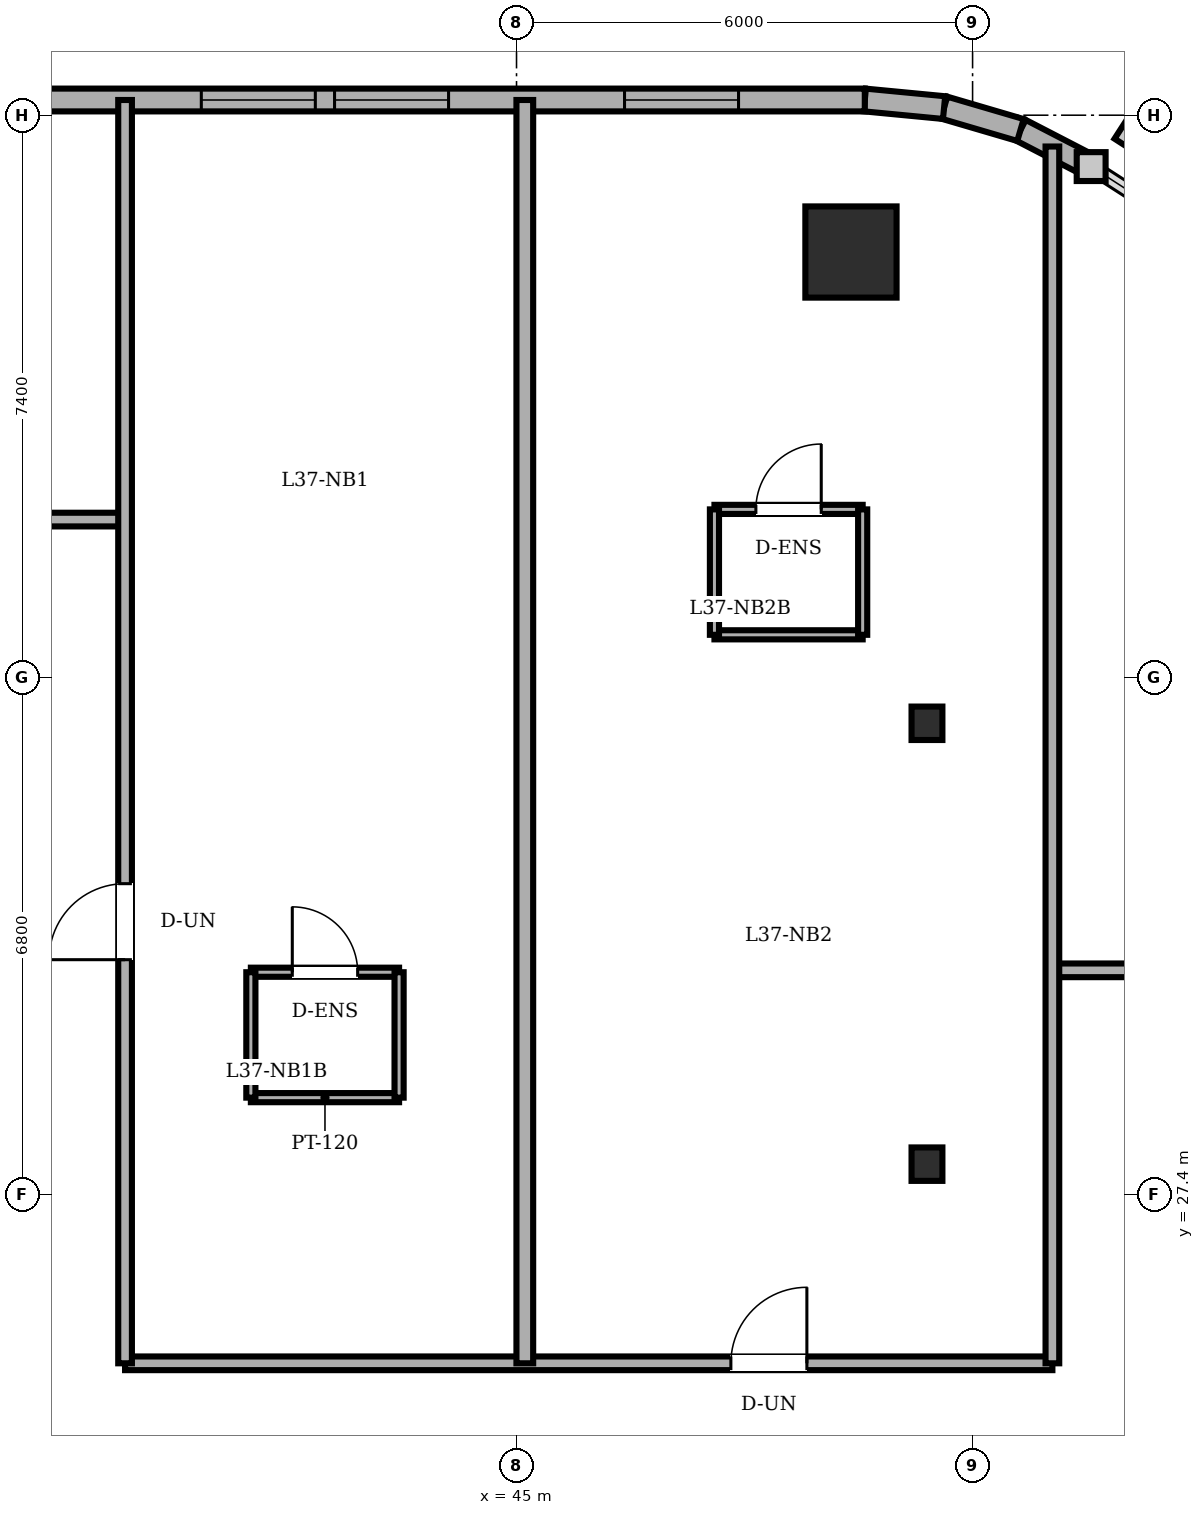
"""IFC4 building model, lengths in metres.
Left out: names, types, materials, properties, quantities, classifications, styles, units other than length and angle.
Written with IfcOpenShell. Run it as: python <this file> out.ifc"""

import sys

from ifc_helpers import new_model, si_unit, direction, frame, frame_2d, origin, origin_2d, place, context, subcontext, project, spatial, rectangle, circle, i_section, extrude, element, fill, save


model = new_model("IFC4")
c1 = context("Model", 3, precision=1e-05, world=origin(), true_north=direction((0.0, 1.0)))
c2 = subcontext(c1, "Body", "Model", "MODEL_VIEW")
j1 = project(units=[si_unit("LENGTHUNIT", "METRE"), si_unit("PLANEANGLEUNIT", "RADIAN")], contexts=[c1])
p1 = place(None, origin())
s1 = spatial("IfcSite", under=j1, at=p1, CompositionType="ELEMENT")
p2 = place(p1, origin())
s2 = spatial("IfcBuilding", under=s1, at=p2, CompositionType="ELEMENT")
p3 = place(p2, frame((0.0, 0.0, 143.8)))
s3 = spatial("IfcBuildingStorey", under=s2, at=p3, CompositionType="ELEMENT", Elevation=143.8)
p4 = place(p3, frame((49.4, 39.8, 0.0), z_axis=(0.0, 0.0, 1.0), x_axis=(1.0, 0.0, 0.0)))
e1 = element("IfcColumn", 1, at=p4, inside=s3, PredefinedType="COLUMN", context=c2, shape_type="SweptSolid", body=[
    extrude(circle(Radius=0.6, at=origin_2d()), origin(), (0.0, 0.0, 1.0), 3.6),
])
for number, where, z_axis, x_axis in (
    (2, (50.4, 27.8, 0.0), (0.0, 0.0, 1.0), (1.0, 0.0, 0.0)),
    (3, (50.4, 33.6, 0.0), (0.0, 0.0, 1.0), (1.0, 0.0, 0.0)),
):
    element("IfcColumn", number, at=place(p3, frame(where, z_axis=z_axis, x_axis=x_axis)), inside=s3, PredefinedType="COLUMN", context=c2, shape_type="SweptSolid", body=[
        extrude(i_section(OverallWidth=0.406, OverallDepth=0.44, WebThickness=0.024, FlangeThickness=0.039, FilletRadius=0.015, at=origin_2d()), origin(), (0.0, 0.0, 1.0), 3.6),
    ])
p5 = place(p3, frame((52.56, 40.924, 0.0), z_axis=(0.0, 0.0, 1.0), x_axis=(-0.888283247196, 0.459296062198, 0.0)))
e4 = element("IfcWall", 4, at=p5, inside=s3, PredefinedType="SOLIDWALL", context=c2, shape_type="SweptSolid", body=[
    extrude(rectangle(XDim=1.047, YDim=0.3, at=frame_2d((0.523, 0.0))), origin(), (0.0, 0.0, 1.0), 3.4),
])
p6 = place(p3, frame((51.63, 41.405, 0.0), z_axis=(0.0, 0.0, 1.0), x_axis=(-0.959528674476, 0.281610942363, 0.0)))
e5 = element("IfcWall", 5, at=p6, inside=s3, PredefinedType="SOLIDWALL", context=c2, shape_type="SweptSolid", body=[
    extrude(rectangle(XDim=1.047, YDim=0.3, at=frame_2d((0.524, 0.0))), origin(), (0.0, 0.0, 1.0), 3.4),
])
p7 = place(p3, frame((50.625, 41.7, 0.0), z_axis=(0.0, 0.0, 1.0), x_axis=(-0.995426089968, 0.095534807324, 0.0)))
e6 = element("IfcWall", 6, at=p7, inside=s3, PredefinedType="SOLIDWALL", context=c2, shape_type="SweptSolid", body=[
    extrude(rectangle(XDim=1.048, YDim=0.3, at=frame_2d((0.524, 0.0))), origin(), (0.0, 0.0, 1.0), 3.4),
])
p8 = place(p3, frame((49.582, 41.8, 0.0), z_axis=(0.0, 0.0, 1.0), x_axis=(-1.0, 0.0, 0.0)))
e7 = element("IfcWall", 7, at=p8, inside=s3, PredefinedType="SOLIDWALL", context=c2, shape_type="SweptSolid", body=[
    extrude(rectangle(XDim=30.282, YDim=0.3, at=frame_2d((15.141, 0.0))), origin(), (0.0, 0.0, 1.0), 3.4),
])
p9 = place(p8, frame((25.707, 0.0, 0.0)))
e8 = element("IfcOpeningElement", 8, at=p9, cuts=e7, PredefinedType="OPENING", context=c2, shape_type="SweptSolid", body=[
    extrude(rectangle(XDim=0.95, YDim=2.2, at=frame_2d((0.475, 1.1))), frame((0.0, 0.16, 0.0), z_axis=(0.0, -1.0, 0.0), x_axis=(1.0, 0.0, 0.0)), (0.0, 0.0, 1.0), 0.32),
])
p10 = place(p8, frame((1.661, 0.0, 0.85)))
e9 = element("IfcOpeningElement", 9, at=p10, cuts=e7, PredefinedType="OPENING", context=c2, shape_type="SweptSolid", body=[
    extrude(rectangle(XDim=1.5, YDim=1.55, at=frame_2d((0.75, 0.775))), frame((0.0, 0.16, 0.0), z_axis=(0.0, -1.0, 0.0), x_axis=(1.0, 0.0, 0.0)), (0.0, 0.0, 1.0), 0.32),
])
p11 = place(p8, frame((5.476, 0.0, 0.85)))
e10 = element("IfcOpeningElement", 10, at=p11, cuts=e7, PredefinedType="OPENING", context=c2, shape_type="SweptSolid", body=[
    extrude(rectangle(XDim=1.5, YDim=1.55, at=frame_2d((0.75, 0.775))), frame((0.0, 0.16, 0.0), z_axis=(0.0, -1.0, 0.0), x_axis=(1.0, 0.0, 0.0)), (0.0, 0.0, 1.0), 0.32),
])
p12 = place(p8, frame((7.229, 0.0, 0.85)))
e11 = element("IfcOpeningElement", 11, at=p12, cuts=e7, PredefinedType="OPENING", context=c2, shape_type="SweptSolid", body=[
    extrude(rectangle(XDim=1.5, YDim=1.55, at=frame_2d((0.75, 0.775))), frame((0.0, 0.16, 0.0), z_axis=(0.0, -1.0, 0.0), x_axis=(1.0, 0.0, 0.0)), (0.0, 0.0, 1.0), 0.32),
])
p13 = place(p8, frame((11.665, 0.0, 0.85)))
e12 = element("IfcOpeningElement", 12, at=p13, cuts=e7, PredefinedType="OPENING", context=c2, shape_type="SweptSolid", body=[
    extrude(rectangle(XDim=1.5, YDim=1.55, at=frame_2d((0.75, 0.775))), frame((0.0, 0.16, 0.0), z_axis=(0.0, -1.0, 0.0), x_axis=(1.0, 0.0, 0.0)), (0.0, 0.0, 1.0), 0.32),
])
p14 = place(p8, frame((14.349, 0.0, 0.85)))
e13 = element("IfcOpeningElement", 13, at=p14, cuts=e7, PredefinedType="OPENING", context=c2, shape_type="SweptSolid", body=[
    extrude(rectangle(XDim=1.5, YDim=1.55, at=frame_2d((0.75, 0.775))), frame((0.0, 0.16, 0.0), z_axis=(0.0, -1.0, 0.0), x_axis=(1.0, 0.0, 0.0)), (0.0, 0.0, 1.0), 0.32),
])
p15 = place(p8, frame((18.932, 0.0, 0.85)))
e14 = element("IfcOpeningElement", 14, at=p15, cuts=e7, PredefinedType="OPENING", context=c2, shape_type="SweptSolid", body=[
    extrude(rectangle(XDim=1.5, YDim=1.55, at=frame_2d((0.75, 0.775))), frame((0.0, 0.16, 0.0), z_axis=(0.0, -1.0, 0.0), x_axis=(1.0, 0.0, 0.0)), (0.0, 0.0, 1.0), 0.32),
])
p16 = place(p8, frame((22.532, 0.0, 0.85)))
e15 = element("IfcOpeningElement", 15, at=p16, cuts=e7, PredefinedType="OPENING", context=c2, shape_type="SweptSolid", body=[
    extrude(rectangle(XDim=1.5, YDim=1.55, at=frame_2d((0.75, 0.775))), frame((0.0, 0.16, 0.0), z_axis=(0.0, -1.0, 0.0), x_axis=(1.0, 0.0, 0.0)), (0.0, 0.0, 1.0), 0.32),
])
p17 = place(p8, frame((27.532, 0.0, 0.85)))
e16 = element("IfcOpeningElement", 16, at=p17, cuts=e7, PredefinedType="OPENING", context=c2, shape_type="SweptSolid", body=[
    extrude(rectangle(XDim=1.5, YDim=1.55, at=frame_2d((0.75, 0.775))), frame((0.0, 0.16, 0.0), z_axis=(0.0, -1.0, 0.0), x_axis=(1.0, 0.0, 0.0)), (0.0, 0.0, 1.0), 0.32),
])
p18 = place(p3, frame((41.505, 30.325, 0.0), z_axis=(0.0, 0.0, 1.0), x_axis=(1.0, 0.0, 0.0)))
e17 = element("IfcWall", 17, at=p18, inside=s3, PredefinedType="PARTITIONING", context=c2, shape_type="SweptSolid", body=[
    extrude(rectangle(XDim=1.95, YDim=0.12, at=frame_2d((0.975, 0.0))), origin(), (0.0, 0.0, 1.0), 3.4),
])
p19 = place(p18, frame((0.545, 0.0, 0.0)))
e18 = element("IfcOpeningElement", 18, at=p19, cuts=e17, PredefinedType="OPENING", context=c2, shape_type="SweptSolid", body=[
    extrude(rectangle(XDim=0.86, YDim=2.1, at=frame_2d((0.43, 1.05))), frame((0.0, 0.07, 0.0), z_axis=(0.0, -1.0, 0.0), x_axis=(1.0, 0.0, 0.0)), (0.0, 0.0, 1.0), 0.14),
])
p20 = place(p3, frame((43.455, 28.675, 0.0), z_axis=(0.0, 0.0, 1.0), x_axis=(-1.0, 0.0, 0.0)))
e19 = element("IfcWall", 19, at=p20, inside=s3, PredefinedType="PARTITIONING", context=c2, shape_type="SweptSolid", body=[
    extrude(rectangle(XDim=1.95, YDim=0.12, at=frame_2d((0.975, 0.0))), origin(), (0.0, 0.0, 1.0), 3.4),
])
for number, where, z_axis, x_axis in (
    (20, (41.505, 30.325, 0.0), (0.0, 0.0, 1.0), (0.0, -1.0, 0.0)),
    (21, (43.455, 28.675, 0.0), (0.0, 0.0, 1.0), (0.0, 1.0, 0.0)),
):
    element("IfcWall", number, at=place(p3, frame(where, z_axis=z_axis, x_axis=x_axis)), inside=s3, PredefinedType="PARTITIONING", context=c2, shape_type="SweptSolid", body=[
        extrude(rectangle(XDim=1.65, YDim=0.12, at=frame_2d((0.825, 0.0))), origin(), (0.0, 0.0, 1.0), 3.4),
    ])
p21 = place(p3, frame((47.604, 36.414, 0.0), z_axis=(0.0, 0.0, 1.0), x_axis=(1.0, 0.0, 0.0)))
e22 = element("IfcWall", 22, at=p21, inside=s3, PredefinedType="PARTITIONING", context=c2, shape_type="SweptSolid", body=[
    extrude(rectangle(XDim=1.95, YDim=0.12, at=frame_2d((0.975, 0.0))), origin(), (0.0, 0.0, 1.0), 3.4),
])
p22 = place(p21, frame((0.545, 0.0, 0.0)))
e23 = element("IfcOpeningElement", 23, at=p22, cuts=e22, PredefinedType="OPENING", context=c2, shape_type="SweptSolid", body=[
    extrude(rectangle(XDim=0.86, YDim=2.1, at=frame_2d((0.43, 1.05))), frame((0.0, 0.07, 0.0), z_axis=(0.0, -1.0, 0.0), x_axis=(1.0, 0.0, 0.0)), (0.0, 0.0, 1.0), 0.14),
])
p23 = place(p3, frame((49.554, 34.764, 0.0), z_axis=(0.0, 0.0, 1.0), x_axis=(-1.0, 0.0, 0.0)))
e24 = element("IfcWall", 24, at=p23, inside=s3, PredefinedType="PARTITIONING", context=c2, shape_type="SweptSolid", body=[
    extrude(rectangle(XDim=1.95, YDim=0.12, at=frame_2d((0.975, 0.0))), origin(), (0.0, 0.0, 1.0), 3.4),
])
for number, where, z_axis, x_axis in (
    (25, (47.604, 36.414, 0.0), (0.0, 0.0, 1.0), (0.0, -1.0, 0.0)),
    (26, (49.554, 34.764, 0.0), (0.0, 0.0, 1.0), (0.0, 1.0, 0.0)),
):
    element("IfcWall", number, at=place(p3, frame(where, z_axis=z_axis, x_axis=x_axis)), inside=s3, PredefinedType="PARTITIONING", context=c2, shape_type="SweptSolid", body=[
        extrude(rectangle(XDim=1.65, YDim=0.12, at=frame_2d((0.825, 0.0))), origin(), (0.0, 0.0, 1.0), 3.4),
    ])
p24 = place(p3, frame((39.85, 25.18, 0.0), z_axis=(0.0, 0.0, 1.0), x_axis=(1.0, 0.0, 0.0)))
e27 = element("IfcWall", 27, at=p24, inside=s3, PredefinedType="PARTITIONING", context=c2, shape_type="SweptSolid", body=[
    extrude(rectangle(XDim=12.2, YDim=0.18, at=frame_2d((6.1, 0.0))), origin(), (0.0, 0.0, 1.0), 3.4),
])
p25 = place(p24, frame((7.97, 0.0, 0.0)))
e28 = element("IfcOpeningElement", 28, at=p25, cuts=e27, PredefinedType="OPENING", context=c2, shape_type="SweptSolid", body=[
    extrude(rectangle(XDim=1.0, YDim=2.15, at=frame_2d((0.5, 1.075))), frame((0.0, 0.1, 0.0), z_axis=(0.0, -1.0, 0.0), x_axis=(1.0, 0.0, 0.0)), (0.0, 0.0, 1.0), 0.2),
])
p26 = place(p3, frame((52.05, 30.35, 0.0), z_axis=(0.0, 0.0, 1.0), x_axis=(1.0, 0.0, 0.0)))
e29 = element("IfcWall", 29, at=p26, inside=s3, PredefinedType="PARTITIONING", context=c2, shape_type="SweptSolid", body=[
    extrude(rectangle(XDim=10.95, YDim=0.18, at=frame_2d((5.475, 0.0))), origin(), (0.0, 0.0, 1.0), 3.4),
])
p27 = place(p26, frame((0.975, 0.0, 0.0)))
e30 = element("IfcOpeningElement", 30, at=p27, cuts=e29, PredefinedType="OPENING", context=c2, shape_type="SweptSolid", body=[
    extrude(rectangle(XDim=0.92, YDim=2.1, at=frame_2d((0.46, 1.05))), frame((0.0, 0.1, 0.0), z_axis=(0.0, -1.0, 0.0), x_axis=(1.0, 0.0, 0.0)), (0.0, 0.0, 1.0), 0.2),
])
p28 = place(p3, frame((13.8, 36.28, 0.0), z_axis=(0.0, 0.0, 1.0), x_axis=(1.0, 0.0, 0.0)))
e31 = element("IfcWall", 31, at=p28, inside=s3, PredefinedType="PARTITIONING", context=c2, shape_type="SweptSolid", body=[
    extrude(rectangle(XDim=26.05, YDim=0.18, at=frame_2d((13.025, 0.0))), origin(), (0.0, 0.0, 1.0), 3.4),
])
p29 = place(p28, frame((12.05, 0.0, 0.0)))
e32 = element("IfcOpeningElement", 32, at=p29, cuts=e31, PredefinedType="OPENING", context=c2, shape_type="SweptSolid", body=[
    extrude(rectangle(XDim=0.9, YDim=2.1, at=frame_2d((0.45, 1.05))), frame((0.0, 0.1, 0.0), z_axis=(0.0, -1.0, 0.0), x_axis=(1.0, 0.0, 0.0)), (0.0, 0.0, 1.0), 0.2),
])
p30 = place(p28, frame((15.67, 0.0, 0.0)))
e33 = element("IfcOpeningElement", 33, at=p30, cuts=e31, PredefinedType="OPENING", context=c2, shape_type="SweptSolid", body=[
    extrude(rectangle(XDim=0.86, YDim=2.1, at=frame_2d((0.43, 1.05))), frame((0.0, 0.1, 0.0), z_axis=(0.0, -1.0, 0.0), x_axis=(1.0, 0.0, 0.0)), (0.0, 0.0, 1.0), 0.2),
])
p31 = place(p28, frame((5.54, 0.0, 0.0)))
e34 = element("IfcOpeningElement", 34, at=p31, cuts=e31, PredefinedType="OPENING", context=c2, shape_type="SweptSolid", body=[
    extrude(rectangle(XDim=0.92, YDim=2.1, at=frame_2d((0.46, 1.05))), frame((0.0, 0.1, 0.0), z_axis=(0.0, -1.0, 0.0), x_axis=(1.0, 0.0, 0.0)), (0.0, 0.0, 1.0), 0.2),
])
p32 = place(p28, frame((21.305, 0.0, 0.0)))
e35 = element("IfcOpeningElement", 35, at=p32, cuts=e31, PredefinedType="OPENING", context=c2, shape_type="SweptSolid", body=[
    extrude(rectangle(XDim=0.92, YDim=2.1, at=frame_2d((0.46, 1.05))), frame((0.0, 0.1, 0.0), z_axis=(0.0, -1.0, 0.0), x_axis=(1.0, 0.0, 0.0)), (0.0, 0.0, 1.0), 0.2),
])
p33 = place(p3, frame((39.85, 25.18, 0.0), z_axis=(0.0, 0.0, 1.0), x_axis=(0.0, 1.0, 0.0)))
e36 = element("IfcWall", 36, at=p33, inside=s3, PredefinedType="PARTITIONING", context=c2, shape_type="SweptSolid", body=[
    extrude(rectangle(XDim=16.62, YDim=0.18, at=frame_2d((8.31, 0.0))), origin(), (0.0, 0.0, 1.0), 3.4),
])
p34 = place(p33, frame((5.31, 0.0, 0.0)))
e37 = element("IfcOpeningElement", 37, at=p34, cuts=e36, PredefinedType="OPENING", context=c2, shape_type="SweptSolid", body=[
    extrude(rectangle(XDim=1.0, YDim=2.15, at=frame_2d((0.5, 1.075))), frame((0.0, 0.1, 0.0), z_axis=(0.0, -1.0, 0.0), x_axis=(1.0, 0.0, 0.0)), (0.0, 0.0, 1.0), 0.2),
])
p35 = place(p3, frame((45.109, 25.18, 0.0), z_axis=(0.0, 0.0, 1.0), x_axis=(0.0, 1.0, 0.0)))
e38 = element("IfcWall", 38, at=p35, inside=s3, PredefinedType="PARTITIONING", context=c2, shape_type="SweptSolid", body=[
    extrude(rectangle(XDim=16.62, YDim=0.22, at=frame_2d((8.31, 0.0))), origin(), (0.0, 0.0, 1.0), 3.4),
])
p36 = place(p3, frame((52.05, 25.18, 0.0), z_axis=(0.0, 0.0, 1.0), x_axis=(0.0, 1.0, 0.0)))
e39 = element("IfcWall", 39, at=p36, inside=s3, PredefinedType="PARTITIONING", context=c2, shape_type="SweptSolid", body=[
    extrude(rectangle(XDim=16.008, YDim=0.18, at=frame_2d((8.004, 0.0))), origin(), (0.0, 0.0, 1.0), 3.4),
])
p37 = place(p10, origin())
e40 = element("IfcWindow", 40, at=p37, inside=s3, PartitioningType="DOUBLE_PANEL_VERTICAL", PredefinedType="WINDOW", context=c2, shape_type="SweptSolid", body=[
    extrude(rectangle(XDim=1.5, YDim=1.55, at=frame_2d((0.75, 0.775))), frame((0.0, 0.03, 0.0), z_axis=(0.0, -1.0, 0.0), x_axis=(1.0, 0.0, 0.0)), (0.0, 0.0, 1.0), 0.06),
])
fill(e9, e40)
p38 = place(p11, origin())
e41 = element("IfcWindow", 41, at=p38, inside=s3, PartitioningType="DOUBLE_PANEL_VERTICAL", PredefinedType="WINDOW", context=c2, shape_type="SweptSolid", body=[
    extrude(rectangle(XDim=1.5, YDim=1.55, at=frame_2d((0.75, 0.775))), frame((0.0, 0.03, 0.0), z_axis=(0.0, -1.0, 0.0), x_axis=(1.0, 0.0, 0.0)), (0.0, 0.0, 1.0), 0.06),
])
fill(e10, e41)
p39 = place(p12, origin())
e42 = element("IfcWindow", 42, at=p39, inside=s3, PartitioningType="DOUBLE_PANEL_VERTICAL", PredefinedType="WINDOW", context=c2, shape_type="SweptSolid", body=[
    extrude(rectangle(XDim=1.5, YDim=1.55, at=frame_2d((0.75, 0.775))), frame((0.0, 0.03, 0.0), z_axis=(0.0, -1.0, 0.0), x_axis=(1.0, 0.0, 0.0)), (0.0, 0.0, 1.0), 0.06),
])
fill(e11, e42)
p40 = place(p19, origin())
e43 = element("IfcDoor", 43, at=p40, inside=s3, OperationType="SINGLE_SWING_LEFT", PredefinedType="DOOR", context=c2, shape_type="SweptSolid", body=[
    extrude(rectangle(XDim=0.86, YDim=2.1, at=frame_2d((0.43, 1.05))), frame((0.0, 0.025, 0.0), z_axis=(0.0, -1.0, 0.0), x_axis=(1.0, 0.0, 0.0)), (0.0, 0.0, 1.0), 0.05),
])
fill(e18, e43)
p41 = place(p22, origin())
e44 = element("IfcDoor", 44, at=p41, inside=s3, OperationType="SINGLE_SWING_RIGHT", PredefinedType="DOOR", context=c2, shape_type="SweptSolid", body=[
    extrude(rectangle(XDim=0.86, YDim=2.1, at=frame_2d((0.43, 1.05))), frame((0.0, 0.025, 0.0), z_axis=(0.0, -1.0, 0.0), x_axis=(1.0, 0.0, 0.0)), (0.0, 0.0, 1.0), 0.05),
])
fill(e23, e44)
p42 = place(p34, origin())
e45 = element("IfcDoor", 45, at=p42, inside=s3, OperationType="SINGLE_SWING_LEFT", PredefinedType="DOOR", context=c2, shape_type="SweptSolid", body=[
    extrude(rectangle(XDim=1.0, YDim=2.15, at=frame_2d((0.5, 1.075))), frame((0.0, 0.025, 0.0), z_axis=(0.0, -1.0, 0.0), x_axis=(1.0, 0.0, 0.0)), (0.0, 0.0, 1.0), 0.05),
])
fill(e37, e45)
p43 = place(p25, origin())
e46 = element("IfcDoor", 46, at=p43, inside=s3, OperationType="SINGLE_SWING_RIGHT", PredefinedType="DOOR", context=c2, shape_type="SweptSolid", body=[
    extrude(rectangle(XDim=1.0, YDim=2.15, at=frame_2d((0.5, 1.075))), frame((0.0, 0.025, 0.0), z_axis=(0.0, -1.0, 0.0), x_axis=(1.0, 0.0, 0.0)), (0.0, 0.0, 1.0), 0.05),
])
fill(e28, e46)
save(model, sys.argv[1])
